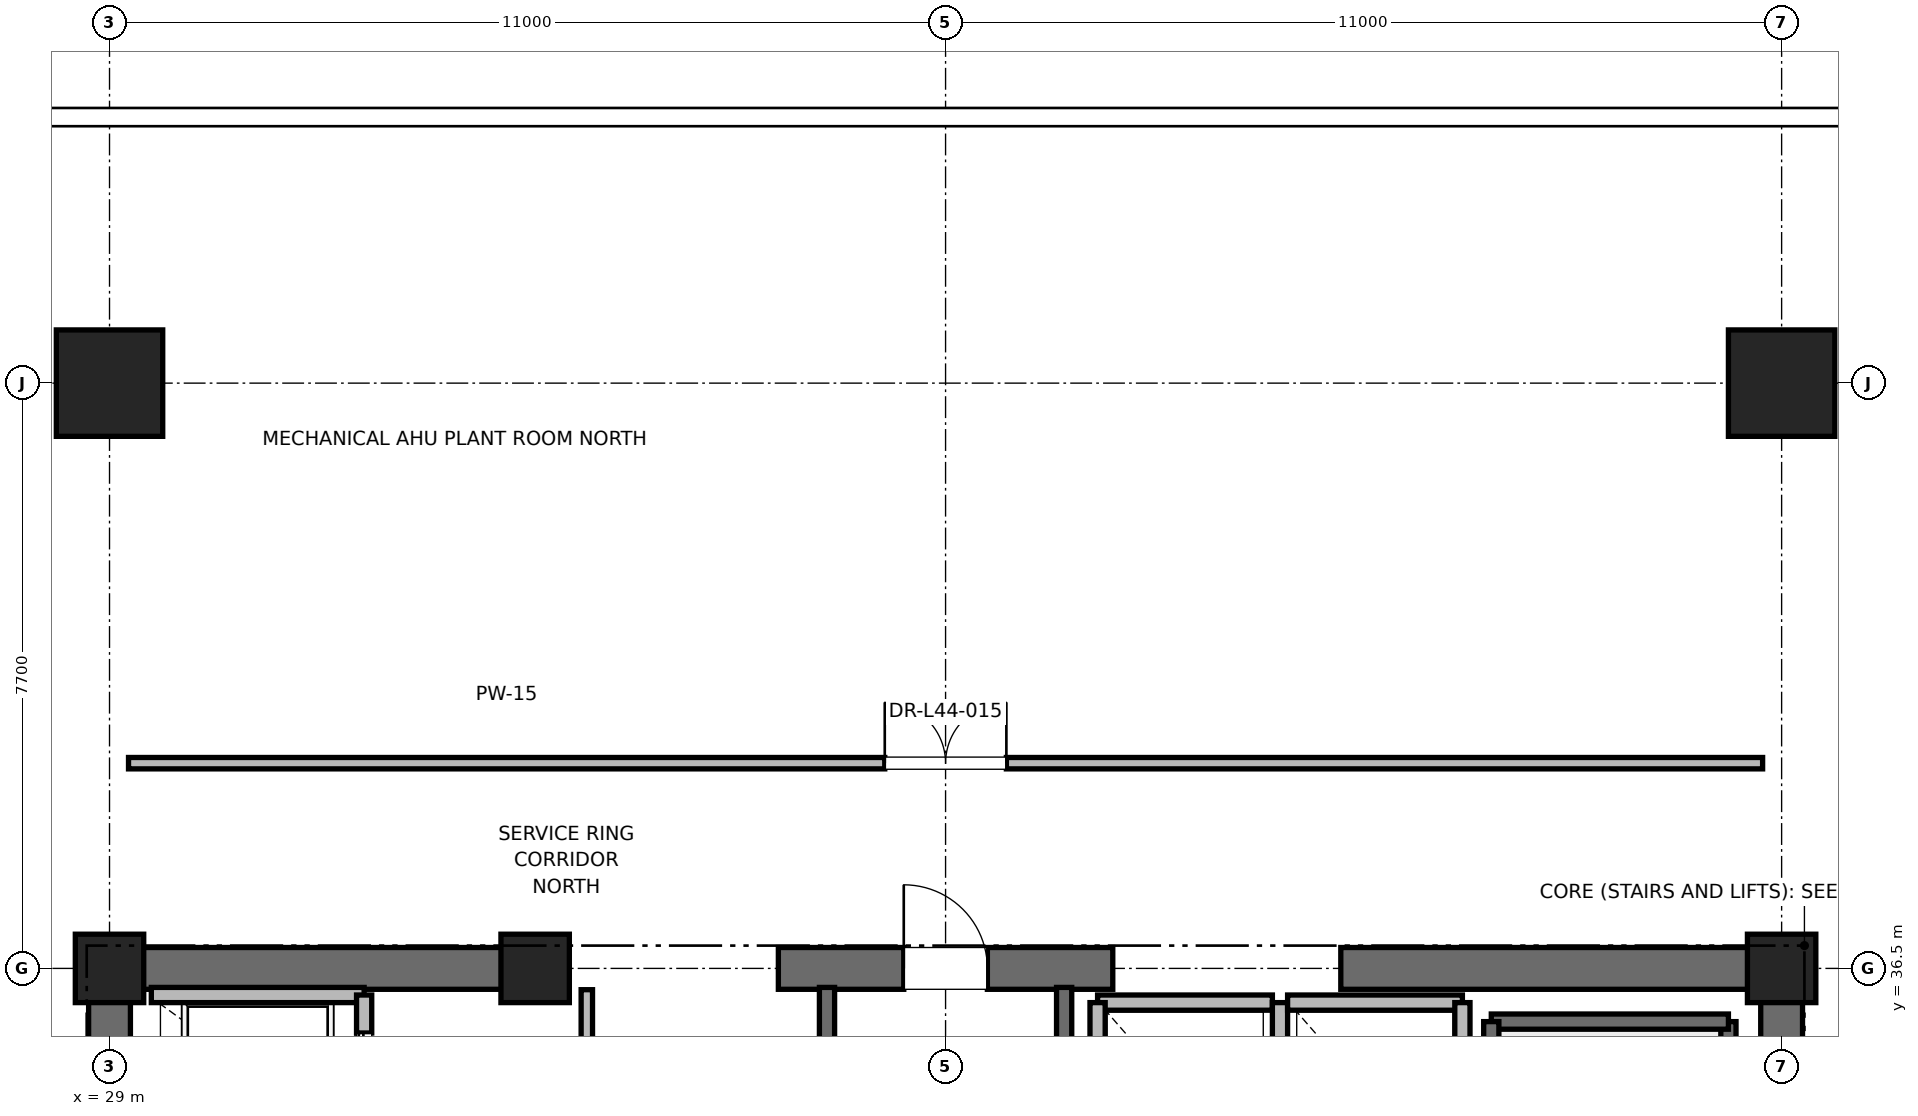
"""IFC4 building model, lengths in metres.
Left out: names, types, materials, properties, quantities, classifications, styles, units other than length and angle.
Written with IfcOpenShell. Run it as: python <this file> out.ifc"""

import sys

from ifc_helpers import new_model, si_unit, direction, frame, frame_2d, origin, origin_2d, place, context, subcontext, project, spatial, rectangle, extrude, element, fill, save


model = new_model("IFC4")
c1 = context("Model", 3, precision=1e-05, world=origin(), true_north=direction((0.0, 1.0)))
c2 = subcontext(c1, "Body", "Model", "MODEL_VIEW")
j1 = project(units=[si_unit("LENGTHUNIT", "METRE"), si_unit("PLANEANGLEUNIT", "RADIAN")], contexts=[c1])
p1 = place(None, origin())
s1 = spatial("IfcSite", under=j1, at=p1, CompositionType="ELEMENT")
p2 = place(p1, origin())
s2 = spatial("IfcBuilding", under=s1, at=p2, CompositionType="ELEMENT")
p3 = place(p2, frame((0.0, 0.0, 189.4)))
s3 = spatial("IfcBuildingStorey", under=s2, at=p3, CompositionType="ELEMENT", Elevation=189.4)
for number, where, z_axis, x_axis in (
    (1, (29.0, 44.2, 0.0), (0.0, 0.0, 1.0), (1.0, 0.0, 0.0)),
    (2, (51.0, 44.2, 0.0), (0.0, 0.0, 1.0), (1.0, 0.0, 0.0)),
):
    element("IfcColumn", number, at=place(p3, frame(where, z_axis=z_axis, x_axis=x_axis)), inside=s3, PredefinedType="COLUMN", context=c2, shape_type="SweptSolid", body=[
        extrude(rectangle(XDim=1.4, YDim=1.4, at=origin_2d()), origin(), (0.0, 0.0, 1.0), 5.4),
    ])
for number, where, z_axis, x_axis in (
    (3, (29.0, 36.5, 0.0), (0.0, 0.0, 1.0), (1.0, 0.0, 0.0)),
    (4, (51.0, 36.5, 0.0), (0.0, 0.0, 1.0), (1.0, 0.0, 0.0)),
    (5, (34.6, 36.5, 0.0), (0.0, 0.0, 1.0), (1.0, 0.0, 0.0)),
):
    element("IfcColumn", number, at=place(p3, frame(where, z_axis=z_axis, x_axis=x_axis)), inside=s3, PredefinedType="PILASTER", context=c2, shape_type="SweptSolid", body=[
        extrude(rectangle(XDim=0.9, YDim=0.9, at=origin_2d()), origin(), (0.0, 0.0, 1.0), 5.4),
    ])
p4 = place(p3, frame((29.0, 36.5, 0.0), z_axis=(0.0, 0.0, 1.0), x_axis=(1.0, 0.0, 0.0)))
e6 = element("IfcWall", 6, at=p4, inside=s3, PredefinedType="SHEAR", context=c2, shape_type="SweptSolid", body=[
    extrude(rectangle(XDim=5.8, YDim=0.55, at=frame_2d((2.9, 0.0))), origin(), (0.0, 0.0, 1.0), 5.1),
])
p5 = place(p3, frame((37.8, 36.5, 0.0), z_axis=(0.0, 0.0, 1.0), x_axis=(1.0, 0.0, 0.0)))
e7 = element("IfcWall", 7, at=p5, inside=s3, PredefinedType="SHEAR", context=c2, shape_type="SweptSolid", body=[
    extrude(rectangle(XDim=4.4, YDim=0.55, at=frame_2d((2.2, 0.0))), origin(), (0.0, 0.0, 1.0), 5.1),
])
p6 = place(p5, frame((1.65, 0.0, 0.0)))
e8 = element("IfcOpeningElement", 8, at=p6, cuts=e7, PredefinedType="OPENING", context=c2, shape_type="SweptSolid", body=[
    extrude(rectangle(XDim=1.1, YDim=2.15, at=frame_2d((0.55, 1.075))), frame((0.0, 0.275, 0.0), z_axis=(0.0, -1.0, 0.0), x_axis=(1.0, 0.0, 0.0)), (0.0, 0.0, 1.0), 0.55),
])
for number, where, z_axis, x_axis in (
    (9, (45.2, 36.5, 0.0), (0.0, 0.0, 1.0), (1.0, 0.0, 0.0)),
    (10, (29.0, 30.7, 0.0), (0.0, 0.0, 1.0), (0.0, 1.0, 0.0)),
):
    element("IfcWall", number, at=place(p3, frame(where, z_axis=z_axis, x_axis=x_axis)), inside=s3, PredefinedType="SHEAR", context=c2, shape_type="SweptSolid", body=[
        extrude(rectangle(XDim=5.8, YDim=0.55, at=frame_2d((2.9, 0.0))), origin(), (0.0, 0.0, 1.0), 5.1),
    ])
p7 = place(p3, frame((51.0, 27.7, 0.0), z_axis=(0.0, 0.0, 1.0), x_axis=(0.0, 1.0, 0.0)))
e11 = element("IfcWall", 11, at=p7, inside=s3, PredefinedType="SHEAR", context=c2, shape_type="SweptSolid", body=[
    extrude(rectangle(XDim=8.8, YDim=0.55, at=frame_2d((4.4, 0.0))), origin(), (0.0, 0.0, 1.0), 5.1),
])
p8 = place(p3, frame((50.3, 27.65, 0.0), z_axis=(0.0, 0.0, 1.0), x_axis=(0.0, 1.0, 0.0)))
e12 = element("IfcWall", 12, at=p8, inside=s3, PredefinedType="SOLIDWALL", context=c2, shape_type="SweptSolid", body=[
    extrude(rectangle(XDim=8.15, YDim=0.2, at=frame_2d((4.075, 0.0))), origin(), (0.0, 0.0, 1.0), 5.1),
])
p9 = place(p3, frame((47.18, 35.8, 0.0), z_axis=(0.0, 0.0, 1.0), x_axis=(1.0, 0.0, 0.0)))
e13 = element("IfcWall", 13, at=p9, inside=s3, PredefinedType="SOLIDWALL", context=c2, shape_type="SweptSolid", body=[
    extrude(rectangle(XDim=3.12, YDim=0.2, at=frame_2d((1.56, 0.0))), origin(), (0.0, 0.0, 1.0), 5.1),
])
p10 = place(p3, frame((47.18, 27.62, 0.0), z_axis=(0.0, 0.0, 1.0), x_axis=(0.0, 1.0, 0.0)))
e14 = element("IfcWall", 14, at=p10, inside=s3, PredefinedType="SOLIDWALL", context=c2, shape_type="SweptSolid", body=[
    extrude(rectangle(XDim=8.18, YDim=0.2, at=frame_2d((4.09, 0.0))), origin(), (0.0, 0.0, 1.0), 5.1),
])
p11 = place(p3, frame((38.44, 27.38, 0.0), z_axis=(0.0, 0.0, 1.0), x_axis=(0.0, 1.0, 0.0)))
e15 = element("IfcWall", 15, at=p11, inside=s3, PredefinedType="SOLIDWALL", context=c2, shape_type="SweptSolid", body=[
    extrude(rectangle(XDim=8.87, YDim=0.2, at=frame_2d((4.435, 0.0))), origin(), (0.0, 0.0, 1.0), 5.1),
])
p12 = place(p3, frame((41.56, 27.68, 0.0), z_axis=(0.0, 0.0, 1.0), x_axis=(0.0, 1.0, 0.0)))
e16 = element("IfcWall", 16, at=p12, inside=s3, PredefinedType="SOLIDWALL", context=c2, shape_type="SweptSolid", body=[
    extrude(rectangle(XDim=8.57, YDim=0.2, at=frame_2d((4.285, 0.0))), origin(), (0.0, 0.0, 1.0), 5.1),
])
p13 = place(p3, frame((32.35, 36.15, 0.0), z_axis=(0.0, 0.0, 1.0), x_axis=(-1.0, 0.0, 0.0)))
e17 = element("IfcWall", 17, at=p13, inside=s3, PredefinedType="SOLIDWALL", context=c2, shape_type="SweptSolid", body=[
    extrude(rectangle(XDim=2.8, YDim=0.2, at=frame_2d((1.4, 0.0))), origin(), (0.0, 0.0, 1.0), 4.154),
])
p14 = place(p3, frame((32.35, 34.05, 0.0), z_axis=(0.0, 0.0, 1.0), x_axis=(0.0, 1.0, 0.0)))
e18 = element("IfcWall", 18, at=p14, inside=s3, PredefinedType="SOLIDWALL", context=c2, shape_type="SweptSolid", body=[
    extrude(rectangle(XDim=2.1, YDim=0.2, at=frame_2d((1.05, 0.0))), origin(), (0.0, 0.0, 1.0), 5.1),
])
p15 = place(p14, frame((0.5, 0.0, 0.0)))
e19 = element("IfcOpeningElement", 19, at=p15, cuts=e18, PredefinedType="OPENING", context=c2, shape_type="SweptSolid", body=[
    extrude(rectangle(XDim=1.1, YDim=2.2, at=frame_2d((0.55, 1.1))), frame((0.0, 0.1, 0.0), z_axis=(0.0, -1.0, 0.0), x_axis=(1.0, 0.0, 0.0)), (0.0, 0.0, 1.0), 0.2),
])
p16 = place(p3, frame((44.3, 36.05, 0.0), z_axis=(0.0, 0.0, 1.0), x_axis=(-1.0, 0.0, 0.0)))
e20 = element("IfcWall", 20, at=p16, inside=s3, PredefinedType="SOLIDWALL", context=c2, shape_type="SweptSolid", body=[
    extrude(rectangle(XDim=2.3, YDim=0.2, at=frame_2d((1.15, 0.0))), origin(), (0.0, 0.0, 1.0), 4.08),
])
for number, where, z_axis, x_axis in (
    (21, (42.0, 36.05, 0.0), (0.0, 0.0, 1.0), (0.0, -1.0, 0.0)),
    (22, (44.4, 33.45, 0.0), (0.0, 0.0, 1.0), (0.0, 1.0, 0.0)),
):
    element("IfcWall", number, at=place(p3, frame(where, z_axis=z_axis, x_axis=x_axis)), inside=s3, PredefinedType="SOLIDWALL", context=c2, shape_type="SweptSolid", body=[
        extrude(rectangle(XDim=2.6, YDim=0.2, at=frame_2d((1.3, 0.0))), origin(), (0.0, 0.0, 1.0), 4.08),
    ])
p17 = place(p3, frame((46.8, 36.05, 0.0), z_axis=(0.0, 0.0, 1.0), x_axis=(-1.0, 0.0, 0.0)))
e23 = element("IfcWall", 23, at=p17, inside=s3, PredefinedType="SOLIDWALL", context=c2, shape_type="SweptSolid", body=[
    extrude(rectangle(XDim=2.3, YDim=0.2, at=frame_2d((1.15, 0.0))), origin(), (0.0, 0.0, 1.0), 4.08),
])
p18 = place(p3, frame((46.8, 33.45, 0.0), z_axis=(0.0, 0.0, 1.0), x_axis=(0.0, 1.0, 0.0)))
e24 = element("IfcWall", 24, at=p18, inside=s3, PredefinedType="SOLIDWALL", context=c2, shape_type="SweptSolid", body=[
    extrude(rectangle(XDim=2.6, YDim=0.2, at=frame_2d((1.3, 0.0))), origin(), (0.0, 0.0, 1.0), 5.1),
])
p19 = place(p3, frame((35.28, 33.95, 0.0), z_axis=(0.0, 0.0, 1.0), x_axis=(0.0, 1.0, 0.0)))
e25 = element("IfcWall", 25, at=p19, inside=s3, PredefinedType="PARTITIONING", context=c2, shape_type="SweptSolid", body=[
    extrude(rectangle(XDim=2.27, YDim=0.15, at=frame_2d((1.135, 0.0))), origin(), (0.0, 0.0, 1.0), 2.85),
])
p20 = place(p19, frame((0.66, 0.0, 0.0)))
e26 = element("IfcOpeningElement", 26, at=p20, cuts=e25, PredefinedType="OPENING", context=c2, shape_type="SweptSolid", body=[
    extrude(rectangle(XDim=0.95, YDim=2.15, at=frame_2d((0.475, 1.075))), frame((0.0, 0.075, 0.0), z_axis=(0.0, -1.0, 0.0), x_axis=(1.0, 0.0, 0.0)), (0.0, 0.0, 1.0), 0.15),
])
p21 = place(p3, frame((29.25, 39.2, 0.0), z_axis=(0.0, 0.0, 1.0), x_axis=(1.0, 0.0, 0.0)))
e27 = element("IfcWall", 27, at=p21, inside=s3, PredefinedType="PARTITIONING", context=c2, shape_type="SweptSolid", body=[
    extrude(rectangle(XDim=21.5, YDim=0.15, at=frame_2d((10.75, 0.0))), origin(), (0.0, 0.0, 1.0), 2.85),
])
p22 = place(p21, frame((9.95, 0.0, 0.0)))
e28 = element("IfcOpeningElement", 28, at=p22, cuts=e27, PredefinedType="OPENING", context=c2, shape_type="SweptSolid", body=[
    extrude(rectangle(XDim=1.6, YDim=2.25, at=frame_2d((0.8, 1.125))), frame((0.0, 0.075, 0.0), z_axis=(0.0, -1.0, 0.0), x_axis=(1.0, 0.0, 0.0)), (0.0, 0.0, 1.0), 0.15),
])
p23 = place(p6, origin())
e29 = element("IfcDoor", 29, at=p23, inside=s3, OperationType="SINGLE_SWING_LEFT", PredefinedType="DOOR", context=c2, shape_type="SweptSolid", body=[
    extrude(rectangle(XDim=1.1, YDim=2.15, at=frame_2d((0.55, 1.075))), frame((0.0, 0.025, 0.0), z_axis=(0.0, -1.0, 0.0), x_axis=(1.0, 0.0, 0.0)), (0.0, 0.0, 1.0), 0.05),
])
fill(e8, e29)
p24 = place(p15, origin())
e30 = element("IfcDoor", 30, at=p24, inside=s3, OperationType="SLIDING_TO_RIGHT", PredefinedType="DOOR", context=c2, shape_type="SweptSolid", body=[
    extrude(rectangle(XDim=1.1, YDim=2.2, at=frame_2d((0.55, 1.1))), frame((0.0, 0.025, 0.0), z_axis=(0.0, -1.0, 0.0), x_axis=(1.0, 0.0, 0.0)), (0.0, 0.0, 1.0), 0.05),
])
fill(e19, e30)
p25 = place(p22, origin())
e31 = element("IfcDoor", 31, at=p25, inside=s3, OperationType="DOUBLE_DOOR_SINGLE_SWING", PredefinedType="DOOR", context=c2, shape_type="SweptSolid", body=[
    extrude(rectangle(XDim=1.6, YDim=2.25, at=frame_2d((0.8, 1.125))), frame((0.0, 0.025, 0.0), z_axis=(0.0, -1.0, 0.0), x_axis=(1.0, 0.0, 0.0)), (0.0, 0.0, 1.0), 0.05),
])
fill(e28, e31)
save(model, sys.argv[1])
